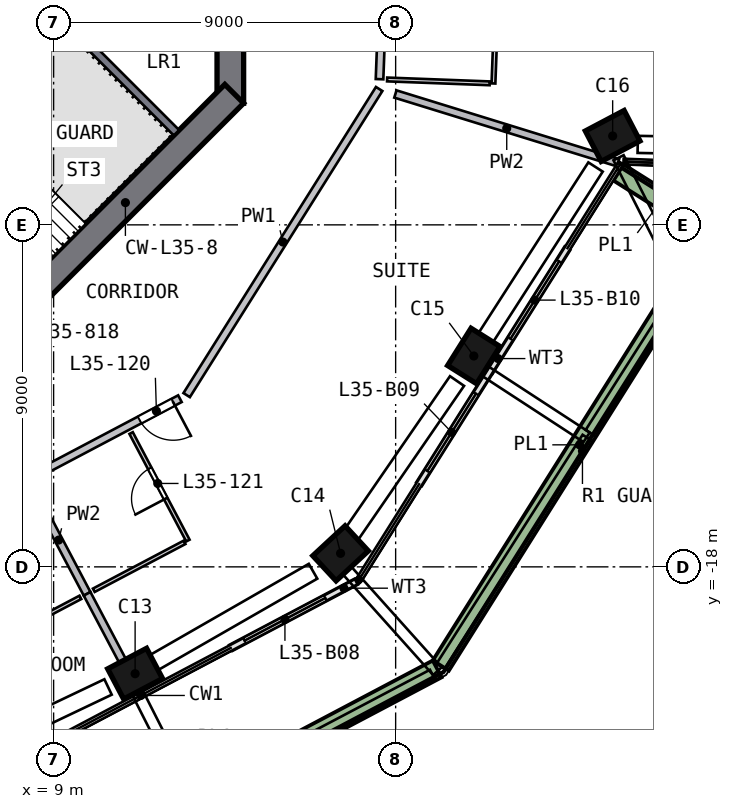
"""IFC4 building model, lengths in metres.
Left out: names, types, materials, properties, quantities, classifications, styles, units other than length and angle.
Written with IfcOpenShell. Run it as: python <this file> out.ifc"""

import sys

from ifc_helpers import new_model, si_unit, direction, frame, frame_2d, origin, origin_2d, place, context, subcontext, project, spatial, rectangle, extrude, element, fill, save


model = new_model("IFC4")
c1 = context("Model", 3, precision=1e-05, world=origin(), true_north=direction((0.0, 1.0)))
c2 = subcontext(c1, "Body", "Model", "MODEL_VIEW")
j1 = project(units=[si_unit("LENGTHUNIT", "METRE"), si_unit("PLANEANGLEUNIT", "RADIAN")], contexts=[c1])
p1 = place(None, origin())
s1 = spatial("IfcSite", under=j1, at=p1, CompositionType="ELEMENT")
p2 = place(p1, origin())
s2 = spatial("IfcBuilding", under=s1, at=p2, CompositionType="ELEMENT")
p3 = place(p2, frame((0.0, 0.0, 147.0)))
s3 = spatial("IfcBuildingStorey", under=s2, at=p3, CompositionType="ELEMENT", Elevation=147.0)
p4 = place(p3, frame((11.025, -20.876, 0.0), z_axis=(0.098865646, 0.053235348, 0.993675793), x_axis=(0.878869132, 0.463661004, -0.112283222)))
e1 = element("IfcColumn", 1, at=p4, inside=s3, PredefinedType="COLUMN", context=c2, shape_type="SweptSolid", body=[
    extrude(rectangle(XDim=1.15, YDim=0.9, at=origin_2d()), origin(), (0.0, 0.0, 1.0), 3.21),
])
p5 = place(p3, frame((16.45, -17.74, 0.0), z_axis=(0.083704558, 0.07899095, 0.99335491), x_axis=(-0.728217367, -0.67561408, 0.115087276)))
e2 = element("IfcColumn", 2, at=p5, inside=s3, PredefinedType="COLUMN", context=c2, shape_type="SweptSolid", body=[
    extrude(rectangle(XDim=1.15, YDim=0.9, at=origin_2d()), origin(), (0.0, 0.0, 1.0), 3.211),
])
p6 = place(p3, frame((19.986, -12.566, 0.0), z_axis=(0.05893902, 0.095595288, 0.993673856), x_axis=(0.528653619, 0.841376242, -0.112300359)))
e3 = element("IfcColumn", 3, at=p6, inside=s3, PredefinedType="COLUMN", context=c2, shape_type="SweptSolid", body=[
    extrude(rectangle(XDim=1.15, YDim=0.9, at=origin_2d()), origin(), (0.0, 0.0, 1.0), 3.21),
])
p7 = place(p3, frame((23.673, -6.797, 0.0), z_axis=(0.031315422, 0.112796327, 0.99312453), x_axis=(-0.884404541, -0.459794613, 0.080109435)))
e4 = element("IfcColumn", 4, at=p7, inside=s3, PredefinedType="COLUMN", context=c2, shape_type="SweptSolid", body=[
    extrude(rectangle(XDim=1.15, YDim=0.9, at=origin_2d()), origin(), (0.0, 0.0, 1.0), 3.212),
])
p8 = place(p3, frame((13.65, -5.799, 0.0), z_axis=(0.0, 0.0, 1.0), x_axis=(0.0, 1.0, 0.0)))
e5 = element("IfcWall", 5, at=p8, inside=s3, PredefinedType="SHEAR", context=c2, shape_type="SweptSolid", body=[
    extrude(rectangle(XDim=11.598, YDim=0.7, at=frame_2d((5.799, 0.0))), origin(), (0.0, 0.0, 1.0), 3.5),
])
p9 = place(p8, frame((4.899, 0.0, 0.0)))
e6 = element("IfcOpeningElement", 6, at=p9, cuts=e5, PredefinedType="OPENING", context=c2, shape_type="SweptSolid", body=[
    extrude(rectangle(XDim=1.8, YDim=2.1, at=frame_2d((0.9, 1.05))), frame((0.0, 0.36, 0.0), z_axis=(0.0, -1.0, 0.0), x_axis=(1.0, 0.0, 0.0)), (0.0, 0.0, 1.0), 0.72),
])
p10 = place(p3, frame((5.552, -13.752, 0.0), z_axis=(0.0, 0.0, 1.0), x_axis=(0.707106781, 0.707106781, 0.0)))
e7 = element("IfcWall", 7, at=p10, inside=s3, PredefinedType="SHEAR", context=c2, shape_type="SweptSolid", body=[
    extrude(rectangle(XDim=11.598, YDim=0.7, at=frame_2d((5.799, 0.0))), origin(), (0.0, 0.0, 1.0), 3.5),
])
p11 = place(p10, frame((2.099, 0.0, 0.0)))
e8 = element("IfcOpeningElement", 8, at=p11, cuts=e7, PredefinedType="OPENING", context=c2, shape_type="SweptSolid", body=[
    extrude(rectangle(XDim=1.2, YDim=2.1, at=frame_2d((0.6, 1.05))), frame((0.0, 0.36, 0.0), z_axis=(0.0, -1.0, 0.0), x_axis=(1.0, 0.0, 0.0)), (0.0, 0.0, 1.0), 0.72),
])
p12 = place(p3, frame((13.672, -20.128, 0.0), z_axis=(0.0, 0.0, 1.0), x_axis=(0.88425645, 0.467001639, 0.0)))
e9 = element("IfcWall", 9, at=p12, inside=s3, PredefinedType="SOLIDWALL", context=c2, shape_type="SweptSolid", body=[
    extrude(rectangle(XDim=3.71, YDim=0.15, at=frame_2d((1.855, 0.0))), origin(), (0.0, 0.0, 1.0), 2.475),
])
p13 = place(p12, frame((0.4, 0.0, 0.0)))
e10 = element("IfcOpeningElement", 10, at=p13, cuts=e9, PredefinedType="OPENING", context=c2, shape_type="SweptSolid", body=[
    extrude(rectangle(XDim=2.4, YDim=2.4, at=frame_2d((1.2, 1.2))), frame((0.0, 0.085, 0.0), z_axis=(0.0, -1.0, 0.0), x_axis=(1.0, 0.0, 0.0)), (0.0, 0.0, 1.0), 0.17),
])
p14 = place(p3, frame((18.623, -15.814, 0.0), z_axis=(0.0, 0.0, 1.0), x_axis=(0.532257872, 0.846582281, 0.0)))
e11 = element("IfcWall", 11, at=p14, inside=s3, PredefinedType="SOLIDWALL", context=c2, shape_type="SweptSolid", body=[
    extrude(rectangle(XDim=3.475, YDim=0.15, at=frame_2d((1.738, 0.0))), origin(), (0.0, 0.0, 1.0), 2.475),
])
p15 = place(p14, frame((0.4, 0.0, 0.0)))
e12 = element("IfcOpeningElement", 12, at=p15, cuts=e11, PredefinedType="OPENING", context=c2, shape_type="SweptSolid", body=[
    extrude(rectangle(XDim=2.4, YDim=2.4, at=frame_2d((1.2, 1.2))), frame((0.0, 0.085, 0.0), z_axis=(0.0, -1.0, 0.0), x_axis=(1.0, 0.0, 0.0)), (0.0, 0.0, 1.0), 0.17),
])
p16 = place(p3, frame((20.473, -12.872, 0.0), z_axis=(0.0, 0.0, 1.0), x_axis=(0.532337095, 0.846532467, 0.0)))
e13 = element("IfcWall", 13, at=p16, inside=s3, PredefinedType="SOLIDWALL", context=c2, shape_type="SweptSolid", body=[
    extrude(rectangle(XDim=3.835, YDim=0.15, at=frame_2d((1.918, 0.0))), origin(), (0.0, 0.0, 1.0), 2.475),
])
p17 = place(p16, frame((1.035, 0.0, 0.0)))
e14 = element("IfcOpeningElement", 14, at=p17, cuts=e13, PredefinedType="OPENING", context=c2, shape_type="SweptSolid", body=[
    extrude(rectangle(XDim=2.4, YDim=2.4, at=frame_2d((1.2, 1.2))), frame((0.0, 0.085, 0.0), z_axis=(0.0, -1.0, 0.0), x_axis=(1.0, 0.0, 0.0)), (0.0, 0.0, 1.0), 0.17),
])
p18 = place(p3, frame((7.401, -26.861, 0.0), z_axis=(0.0, 0.0, 1.0), x_axis=(0.884258121, 0.466998474, 0.0)))
e15 = element("IfcWall", 15, at=p18, inside=s3, PredefinedType="SOLIDWALL", context=c2, shape_type="SweptSolid", body=[
    extrude(rectangle(XDim=13.223, YDim=0.5, at=frame_2d((6.612, 0.0))), origin(), (0.0, 0.0, 1.0), 0.7),
])
p19 = place(p3, frame((19.189, -20.598, 0.0), z_axis=(0.0, 0.0, 1.0), x_axis=(0.532283757, 0.846566005, 0.0)))
e16 = element("IfcWall", 16, at=p19, inside=s3, PredefinedType="SOLIDWALL", context=c2, shape_type="SweptSolid", body=[
    extrude(rectangle(XDim=13.723, YDim=0.5, at=frame_2d((6.862, 0.0))), origin(), (0.0, 0.0, 1.0), 0.7),
])
p20 = place(p3, frame((26.149, -9.059, 0.0), z_axis=(0.0, 0.0, 1.0), x_axis=(-0.846546878, 0.532314177, 0.0)))
e17 = element("IfcWall", 17, at=p20, inside=s3, PredefinedType="SOLIDWALL", context=c2, shape_type="SweptSolid", body=[
    extrude(rectangle(XDim=2.699, YDim=0.5, at=frame_2d((1.35, 0.0))), origin(), (0.0, 0.0, 1.0), 0.7),
])
p21 = place(p3, frame((9.334, -3.535, 0.0), z_axis=(0.0, 0.0, 1.0), x_axis=(-0.707106781, -0.707106781, 0.0)))
e18 = element("IfcWall", 18, at=p21, inside=s3, PredefinedType="SOLIDWALL", context=c2, shape_type="SweptSolid", body=[
    extrude(rectangle(XDim=8.2, YDim=0.2, at=frame_2d((4.1, 0.0))), origin(), (0.0, 0.0, 1.0), 3.19),
])
p22 = place(p21, frame((6.6, 0.0, 0.0)))
e19 = element("IfcOpeningElement", 19, at=p22, cuts=e18, PredefinedType="OPENING", context=c2, shape_type="SweptSolid", body=[
    extrude(rectangle(XDim=1.2, YDim=2.1, at=frame_2d((0.6, 1.05))), frame((0.0, 0.11, 0.0), z_axis=(0.0, -1.0, 0.0), x_axis=(1.0, 0.0, 0.0)), (0.0, 0.0, 1.0), 0.22),
])
p23 = place(p3, frame((9.334, -3.677, 0.0), z_axis=(0.0, 0.0, 1.0), x_axis=(0.707106781, -0.707106781, 0.0)))
e20 = element("IfcWall", 20, at=p23, inside=s3, PredefinedType="SOLIDWALL", context=c2, shape_type="SweptSolid", body=[
    extrude(rectangle(XDim=4.1, YDim=0.2, at=frame_2d((2.05, 0.0))), origin(), (0.0, 0.0, 1.0), 3.19),
])
p24 = place(p3, frame((12.323, -13.574, 0.0), z_axis=(0.0, 0.0, 1.0), x_axis=(-0.8842539, -0.467006467, 0.0)))
e21 = element("IfcWall", 21, at=p24, inside=s3, PredefinedType="SOLIDWALL", context=c2, shape_type="SweptSolid", body=[
    extrude(rectangle(XDim=9.116, YDim=0.2, at=frame_2d((4.558, 0.0))), origin(), (0.0, 0.0, 1.0), 3.19),
])
p25 = place(p24, frame((0.2, 0.0, 0.0)))
e22 = element("IfcOpeningElement", 22, at=p25, cuts=e21, PredefinedType="OPENING", context=c2, shape_type="SweptSolid", body=[
    extrude(rectangle(XDim=1.0, YDim=2.1, at=frame_2d((0.5, 1.05))), frame((0.0, 0.11, 0.0), z_axis=(0.0, -1.0, 0.0), x_axis=(1.0, 0.0, 0.0)), (0.0, 0.0, 1.0), 0.22),
])
p26 = place(p3, frame((12.501, -13.48, 0.0), z_axis=(0.0, 0.0, 1.0), x_axis=(0.532282406, 0.846566855, 0.0)))
e23 = element("IfcWall", 23, at=p26, inside=s3, PredefinedType="SOLIDWALL", context=c2, shape_type="SweptSolid", body=[
    extrude(rectangle(XDim=9.516, YDim=0.2, at=frame_2d((4.758, 0.0))), origin(), (0.0, 0.0, 1.0), 3.19),
])
p27 = place(p3, frame((17.576, -5.166, 0.0), z_axis=(0.0, 0.0, 1.0), x_axis=(0.037699539, 0.99928912, 0.0)))
e24 = element("IfcWall", 24, at=p27, inside=s3, PredefinedType="SOLIDWALL", context=c2, shape_type="SweptSolid", body=[
    extrude(rectangle(XDim=3.4, YDim=0.2, at=frame_2d((1.7, 0.0))), origin(), (0.0, 0.0, 1.0), 3.19),
])
p28 = place(p3, frame((8.387, -15.88, 0.0), z_axis=(0.0, 0.0, 1.0), x_axis=(0.466969105, -0.884273631, 0.0)))
e25 = element("IfcWall", 25, at=p28, inside=s3, PredefinedType="SOLIDWALL", context=c2, shape_type="SweptSolid", body=[
    extrude(rectangle(XDim=3.2, YDim=0.2, at=frame_2d((1.6, 0.0))), origin(), (0.0, 0.0, 1.0), 3.19),
])
p29 = place(p3, frame((9.881, -18.709, 0.0), z_axis=(0.0, 0.0, 1.0), x_axis=(0.46703191, -0.884240462, 0.0)))
e26 = element("IfcWall", 26, at=p29, inside=s3, PredefinedType="SOLIDWALL", context=c2, shape_type="SweptSolid", body=[
    extrude(rectangle(XDim=2.95, YDim=0.2, at=frame_2d((1.475, 0.0))), origin(), (0.0, 0.0, 1.0), 3.19),
])
p30 = place(p3, frame((17.994, -5.556, 0.0), z_axis=(0.0, 0.0, 1.0), x_axis=(0.955479808, -0.295056496, 0.0)))
e27 = element("IfcWall", 27, at=p30, inside=s3, PredefinedType="SOLIDWALL", context=c2, shape_type="SweptSolid", body=[
    extrude(rectangle(XDim=6.132, YDim=0.2, at=frame_2d((3.066, 0.0))), origin(), (0.0, 0.0, 1.0), 3.19),
])
for number, where, z_axis, x_axis in (
    (28, (7.317, -20.064, 0.0), (0.0, 0.0, 1.0), (0.884, 0.467, 0.0)),
    (29, (12.445, -17.355, 0.0), (0.0, 0.0, 1.0), (-0.884, -0.467, 0.0)),
):
    element("IfcWall", number, at=place(p3, frame(where, z_axis=z_axis, x_axis=x_axis)), inside=s3, PredefinedType="PARTITIONING", context=c2, shape_type="SweptSolid", body=[
        extrude(rectangle(XDim=2.7, YDim=0.1, at=frame_2d((1.35, 0.0))), origin(), (0.0, 0.0, 1.0), 3.19),
    ])
p31 = place(p3, frame((12.534, -17.308, 0.0), z_axis=(0.0, 0.0, 1.0), x_axis=(-0.467000609, 0.884256994, 0.0)))
e30 = element("IfcWall", 30, at=p31, inside=s3, PredefinedType="PARTITIONING", context=c2, shape_type="SweptSolid", body=[
    extrude(rectangle(XDim=3.2, YDim=0.1, at=frame_2d((1.6, 0.0))), origin(), (0.0, 0.0, 1.0), 3.19),
])
p32 = place(p31, frame((1.25, 0.0, 0.0)))
e31 = element("IfcOpeningElement", 31, at=p32, cuts=e30, PredefinedType="OPENING", context=c2, shape_type="SweptSolid", body=[
    extrude(rectangle(XDim=0.9, YDim=2.1, at=frame_2d((0.45, 1.05))), frame((0.0, 0.06, 0.0), z_axis=(0.0, -1.0, 0.0), x_axis=(1.0, 0.0, 0.0)), (0.0, 0.0, 1.0), 0.12),
])
p33 = place(p3, frame((17.776, -5.174, 0.0), z_axis=(0.0, 0.0, 1.0), x_axis=(0.999288955, -0.037703899, 0.0)))
e32 = element("IfcWall", 32, at=p33, inside=s3, PredefinedType="PARTITIONING", context=c2, shape_type="SweptSolid", body=[
    extrude(rectangle(XDim=2.7, YDim=0.1, at=frame_2d((1.35, 0.0))), origin(), (0.0, 0.0, 1.0), 3.19),
])
p34 = place(p3, frame((20.574, -5.279, 0.0), z_axis=(0.0, 0.0, 1.0), x_axis=(0.037688886, 0.999289522, 0.0)))
e33 = element("IfcWall", 33, at=p34, inside=s3, PredefinedType="PARTITIONING", context=c2, shape_type="SweptSolid", body=[
    extrude(rectangle(XDim=3.2, YDim=0.1, at=frame_2d((1.6, 0.0))), origin(), (0.0, 0.0, 1.0), 3.19),
])
p35 = place(p34, frame((1.25, 0.0, 0.0)))
e34 = element("IfcOpeningElement", 34, at=p35, cuts=e33, PredefinedType="OPENING", context=c2, shape_type="SweptSolid", body=[
    extrude(rectangle(XDim=0.9, YDim=2.1, at=frame_2d((0.45, 1.05))), frame((0.0, 0.06, 0.0), z_axis=(0.0, -1.0, 0.0), x_axis=(1.0, 0.0, 0.0)), (0.0, 0.0, 1.0), 0.12),
])
p36 = place(p13, origin())
e35 = element("IfcDoor", 35, at=p36, inside=s3, OperationType="SLIDING_TO_RIGHT", PredefinedType="DOOR", context=c2, shape_type="SweptSolid", body=[
    extrude(rectangle(XDim=2.4, YDim=2.4, at=frame_2d((1.2, 1.2))), frame((0.0, 0.025, 0.0), z_axis=(0.0, -1.0, 0.0), x_axis=(1.0, 0.0, 0.0)), (0.0, 0.0, 1.0), 0.05),
])
fill(e10, e35)
p37 = place(p15, origin())
e36 = element("IfcDoor", 36, at=p37, inside=s3, OperationType="SLIDING_TO_RIGHT", PredefinedType="DOOR", context=c2, shape_type="SweptSolid", body=[
    extrude(rectangle(XDim=2.4, YDim=2.4, at=frame_2d((1.2, 1.2))), frame((0.0, 0.025, 0.0), z_axis=(0.0, -1.0, 0.0), x_axis=(1.0, 0.0, 0.0)), (0.0, 0.0, 1.0), 0.05),
])
fill(e12, e36)
p38 = place(p17, origin())
e37 = element("IfcDoor", 37, at=p38, inside=s3, OperationType="SLIDING_TO_LEFT", PredefinedType="DOOR", context=c2, shape_type="SweptSolid", body=[
    extrude(rectangle(XDim=2.4, YDim=2.4, at=frame_2d((1.2, 1.2))), frame((0.0, 0.025, 0.0), z_axis=(0.0, -1.0, 0.0), x_axis=(1.0, 0.0, 0.0)), (0.0, 0.0, 1.0), 0.05),
])
fill(e14, e37)
p39 = place(p25, origin())
e38 = element("IfcDoor", 38, at=p39, inside=s3, OperationType="SINGLE_SWING_LEFT", PredefinedType="DOOR", context=c2, shape_type="SweptSolid", body=[
    extrude(rectangle(XDim=1.0, YDim=2.1, at=frame_2d((0.5, 1.05))), frame((0.0, 0.025, 0.0), z_axis=(0.0, -1.0, 0.0), x_axis=(1.0, 0.0, 0.0)), (0.0, 0.0, 1.0), 0.05),
])
fill(e22, e38)
p40 = place(p32, origin())
e39 = element("IfcDoor", 39, at=p40, inside=s3, OperationType="SINGLE_SWING_LEFT", PredefinedType="DOOR", context=c2, shape_type="SweptSolid", body=[
    extrude(rectangle(XDim=0.9, YDim=2.1, at=frame_2d((0.45, 1.05))), frame((0.0, 0.025, 0.0), z_axis=(0.0, -1.0, 0.0), x_axis=(1.0, 0.0, 0.0)), (0.0, 0.0, 1.0), 0.05),
])
fill(e31, e39)
save(model, sys.argv[1])
